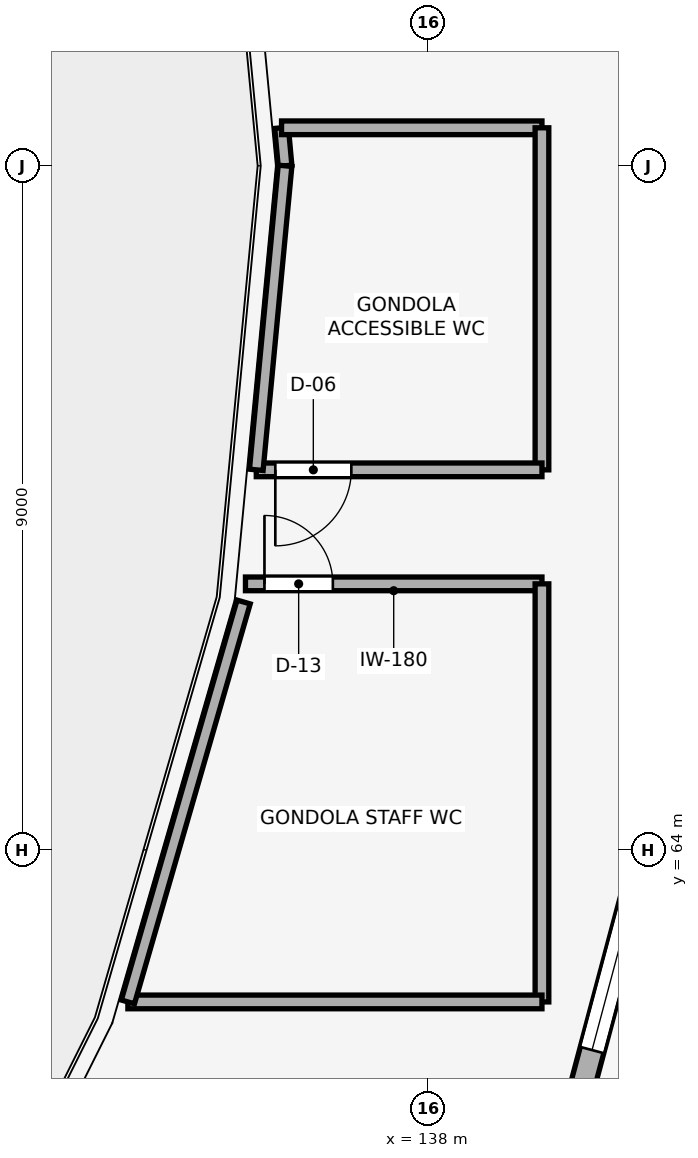
"""IFC4 building model, lengths in metres.
Left out: names, types, materials, properties, quantities, classifications, styles, units other than length and angle.
Written with IfcOpenShell. Run it as: python <this file> out.ifc"""

import sys

from ifc_helpers import new_model, si_unit, direction, frame, frame_2d, origin, place, context, subcontext, project, spatial, rectangle, extrude, element, fill, save


model = new_model("IFC4")
c1 = context("Model", 3, precision=1e-05, world=origin(), true_north=direction((0.0, 1.0)))
c2 = subcontext(c1, "Body", "Model", "MODEL_VIEW")
j1 = project(units=[si_unit("LENGTHUNIT", "METRE"), si_unit("PLANEANGLEUNIT", "RADIAN")], contexts=[c1])
p1 = place(None, origin())
s1 = spatial("IfcSite", under=j1, at=p1, CompositionType="ELEMENT")
p2 = place(p1, origin())
s2 = spatial("IfcBuilding", under=s1, at=p2, CompositionType="ELEMENT")
p3 = place(p2, frame((0.0, 0.0, 24.0)))
s3 = spatial("IfcBuildingStorey", under=s2, at=p3, CompositionType="ELEMENT", Elevation=24.0)
p4 = place(p3, frame((141.3, 65.642, 0.0), z_axis=(0.0, 0.0, 1.0), x_axis=(-0.257735684167, -0.966215461016, 0.0)))
e1 = element("IfcWall", 1, at=p4, inside=s3, PredefinedType="STANDARD", context=c2, shape_type="SweptSolid", body=[
    extrude(rectangle(XDim=6.45, YDim=0.32, at=frame_2d((3.225, 0.0))), origin(), (0.0, 0.0, 1.0), 3.38),
])
p5 = place(p4, frame((2.025, 0.0, 1.15)))
e2 = element("IfcOpeningElement", 2, at=p5, cuts=e1, PredefinedType="OPENING", context=c2, shape_type="SweptSolid", body=[
    extrude(rectangle(XDim=2.4, YDim=1.4, at=frame_2d((1.2, 0.7))), frame((0.0, 0.17, 0.0), z_axis=(0.0, -1.0, 0.0), x_axis=(1.0, 0.0, 0.0)), (0.0, 0.0, 1.0), 0.34),
])
p6 = place(p3, frame((135.599, 67.5, 0.0), z_axis=(0.0, 0.0, 1.0), x_axis=(1.0, 0.0, 0.0)))
e3 = element("IfcWall", 3, at=p6, inside=s3, PredefinedType="PARTITIONING", context=c2, shape_type="SweptSolid", body=[
    extrude(rectangle(XDim=3.901, YDim=0.18, at=frame_2d((1.95, 0.0))), origin(), (0.0, 0.0, 1.0), 3.38),
])
p7 = place(p6, frame((0.25, 0.0, 0.0)))
e4 = element("IfcOpeningElement", 4, at=p7, cuts=e3, PredefinedType="OPENING", context=c2, shape_type="SweptSolid", body=[
    extrude(rectangle(XDim=0.9, YDim=2.1, at=frame_2d((0.45, 1.05))), frame((0.0, 0.1, 0.0), z_axis=(0.0, -1.0, 0.0), x_axis=(1.0, 0.0, 0.0)), (0.0, 0.0, 1.0), 0.2),
])
p8 = place(p3, frame((139.5, 67.5, 0.0), z_axis=(0.0, 0.0, 1.0), x_axis=(0.0, -1.0, 0.0)))
e5 = element("IfcWall", 5, at=p8, inside=s3, PredefinedType="PARTITIONING", context=c2, shape_type="SweptSolid", body=[
    extrude(rectangle(XDim=5.5, YDim=0.18, at=frame_2d((2.75, 0.0))), origin(), (0.0, 0.0, 1.0), 3.38),
])
p9 = place(p3, frame((139.5, 62.0, 0.0), z_axis=(0.0, 0.0, 1.0), x_axis=(-1.0, 0.0, 0.0)))
e6 = element("IfcWall", 6, at=p9, inside=s3, PredefinedType="PARTITIONING", context=c2, shape_type="SweptSolid", body=[
    extrude(rectangle(XDim=5.448, YDim=0.18, at=frame_2d((2.724, 0.0))), origin(), (0.0, 0.0, 1.0), 3.38),
])
p10 = place(p3, frame((134.052, 62.0, 0.0), z_axis=(0.0, 0.0, 1.0), x_axis=(0.277957422559, 0.960593395378, 0.0)))
e7 = element("IfcWall", 7, at=p10, inside=s3, PredefinedType="PARTITIONING", context=c2, shape_type="SweptSolid", body=[
    extrude(rectangle(XDim=5.477, YDim=0.18, at=frame_2d((2.739, 0.0))), origin(), (0.0, 0.0, 1.0), 3.38),
])
p11 = place(p3, frame((136.12, 73.0, 0.0), z_axis=(0.0, 0.0, 1.0), x_axis=(-0.091894673088, 0.995768732718, 0.0)))
e8 = element("IfcWall", 8, at=p11, inside=s3, PredefinedType="PARTITIONING", context=c2, shape_type="SweptSolid", body=[
    extrude(rectangle(XDim=0.502, YDim=0.18, at=frame_2d((0.251, 0.0))), origin(), (0.0, 0.0, 1.0), 3.38),
])
p12 = place(p3, frame((136.074, 73.5, 0.0), z_axis=(0.0, 0.0, 1.0), x_axis=(1.0, 0.0, 0.0)))
e9 = element("IfcWall", 9, at=p12, inside=s3, PredefinedType="PARTITIONING", context=c2, shape_type="SweptSolid", body=[
    extrude(rectangle(XDim=3.426, YDim=0.18, at=frame_2d((1.713, 0.0))), origin(), (0.0, 0.0, 1.0), 3.38),
])
p13 = place(p3, frame((139.5, 73.5, 0.0), z_axis=(0.0, 0.0, 1.0), x_axis=(0.0, -1.0, 0.0)))
e10 = element("IfcWall", 10, at=p13, inside=s3, PredefinedType="PARTITIONING", context=c2, shape_type="SweptSolid", body=[
    extrude(rectangle(XDim=4.5, YDim=0.18, at=frame_2d((2.25, 0.0))), origin(), (0.0, 0.0, 1.0), 3.38),
])
p14 = place(p3, frame((139.5, 69.0, 0.0), z_axis=(0.0, 0.0, 1.0), x_axis=(-1.0, 0.0, 0.0)))
e11 = element("IfcWall", 11, at=p14, inside=s3, PredefinedType="PARTITIONING", context=c2, shape_type="SweptSolid", body=[
    extrude(rectangle(XDim=3.758, YDim=0.18, at=frame_2d((1.879, 0.0))), origin(), (0.0, 0.0, 1.0), 3.38),
])
p15 = place(p14, frame((2.508, 0.0, 0.0)))
e12 = element("IfcOpeningElement", 12, at=p15, cuts=e11, PredefinedType="OPENING", context=c2, shape_type="SweptSolid", body=[
    extrude(rectangle(XDim=1.0, YDim=2.15, at=frame_2d((0.5, 1.075))), frame((0.0, 0.1, 0.0), z_axis=(0.0, -1.0, 0.0), x_axis=(1.0, 0.0, 0.0)), (0.0, 0.0, 1.0), 0.2),
])
p16 = place(p3, frame((135.742, 69.0, 0.0), z_axis=(0.0, 0.0, 1.0), x_axis=(0.094183957362, 0.995554811236, 0.0)))
e13 = element("IfcWall", 13, at=p16, inside=s3, PredefinedType="PARTITIONING", context=c2, shape_type="SweptSolid", body=[
    extrude(rectangle(XDim=4.018, YDim=0.18, at=frame_2d((2.009, 0.0))), origin(), (0.0, 0.0, 1.0), 3.38),
])
p17 = place(p5, origin())
e14 = element("IfcWindow", 14, at=p17, inside=s3, PartitioningType="SINGLE_PANEL", PredefinedType="WINDOW", context=c2, shape_type="SweptSolid", body=[
    extrude(rectangle(XDim=2.4, YDim=1.4, at=frame_2d((1.2, 0.7))), frame((0.0, 0.03, 0.0), z_axis=(0.0, -1.0, 0.0), x_axis=(1.0, 0.0, 0.0)), (0.0, 0.0, 1.0), 0.06),
])
fill(e2, e14)
p18 = place(p7, origin())
e15 = element("IfcDoor", 15, at=p18, inside=s3, OperationType="SINGLE_SWING_LEFT", PredefinedType="DOOR", context=c2, shape_type="SweptSolid", body=[
    extrude(rectangle(XDim=0.9, YDim=2.1, at=frame_2d((0.45, 1.05))), frame((0.0, 0.025, 0.0), z_axis=(0.0, -1.0, 0.0), x_axis=(1.0, 0.0, 0.0)), (0.0, 0.0, 1.0), 0.05),
])
fill(e4, e15)
p19 = place(p15, origin())
e16 = element("IfcDoor", 16, at=p19, inside=s3, OperationType="SINGLE_SWING_RIGHT", PredefinedType="DOOR", context=c2, shape_type="SweptSolid", body=[
    extrude(rectangle(XDim=1.0, YDim=2.15, at=frame_2d((0.5, 1.075))), frame((0.0, 0.025, 0.0), z_axis=(0.0, -1.0, 0.0), x_axis=(1.0, 0.0, 0.0)), (0.0, 0.0, 1.0), 0.05),
])
fill(e12, e16)
save(model, sys.argv[1])
